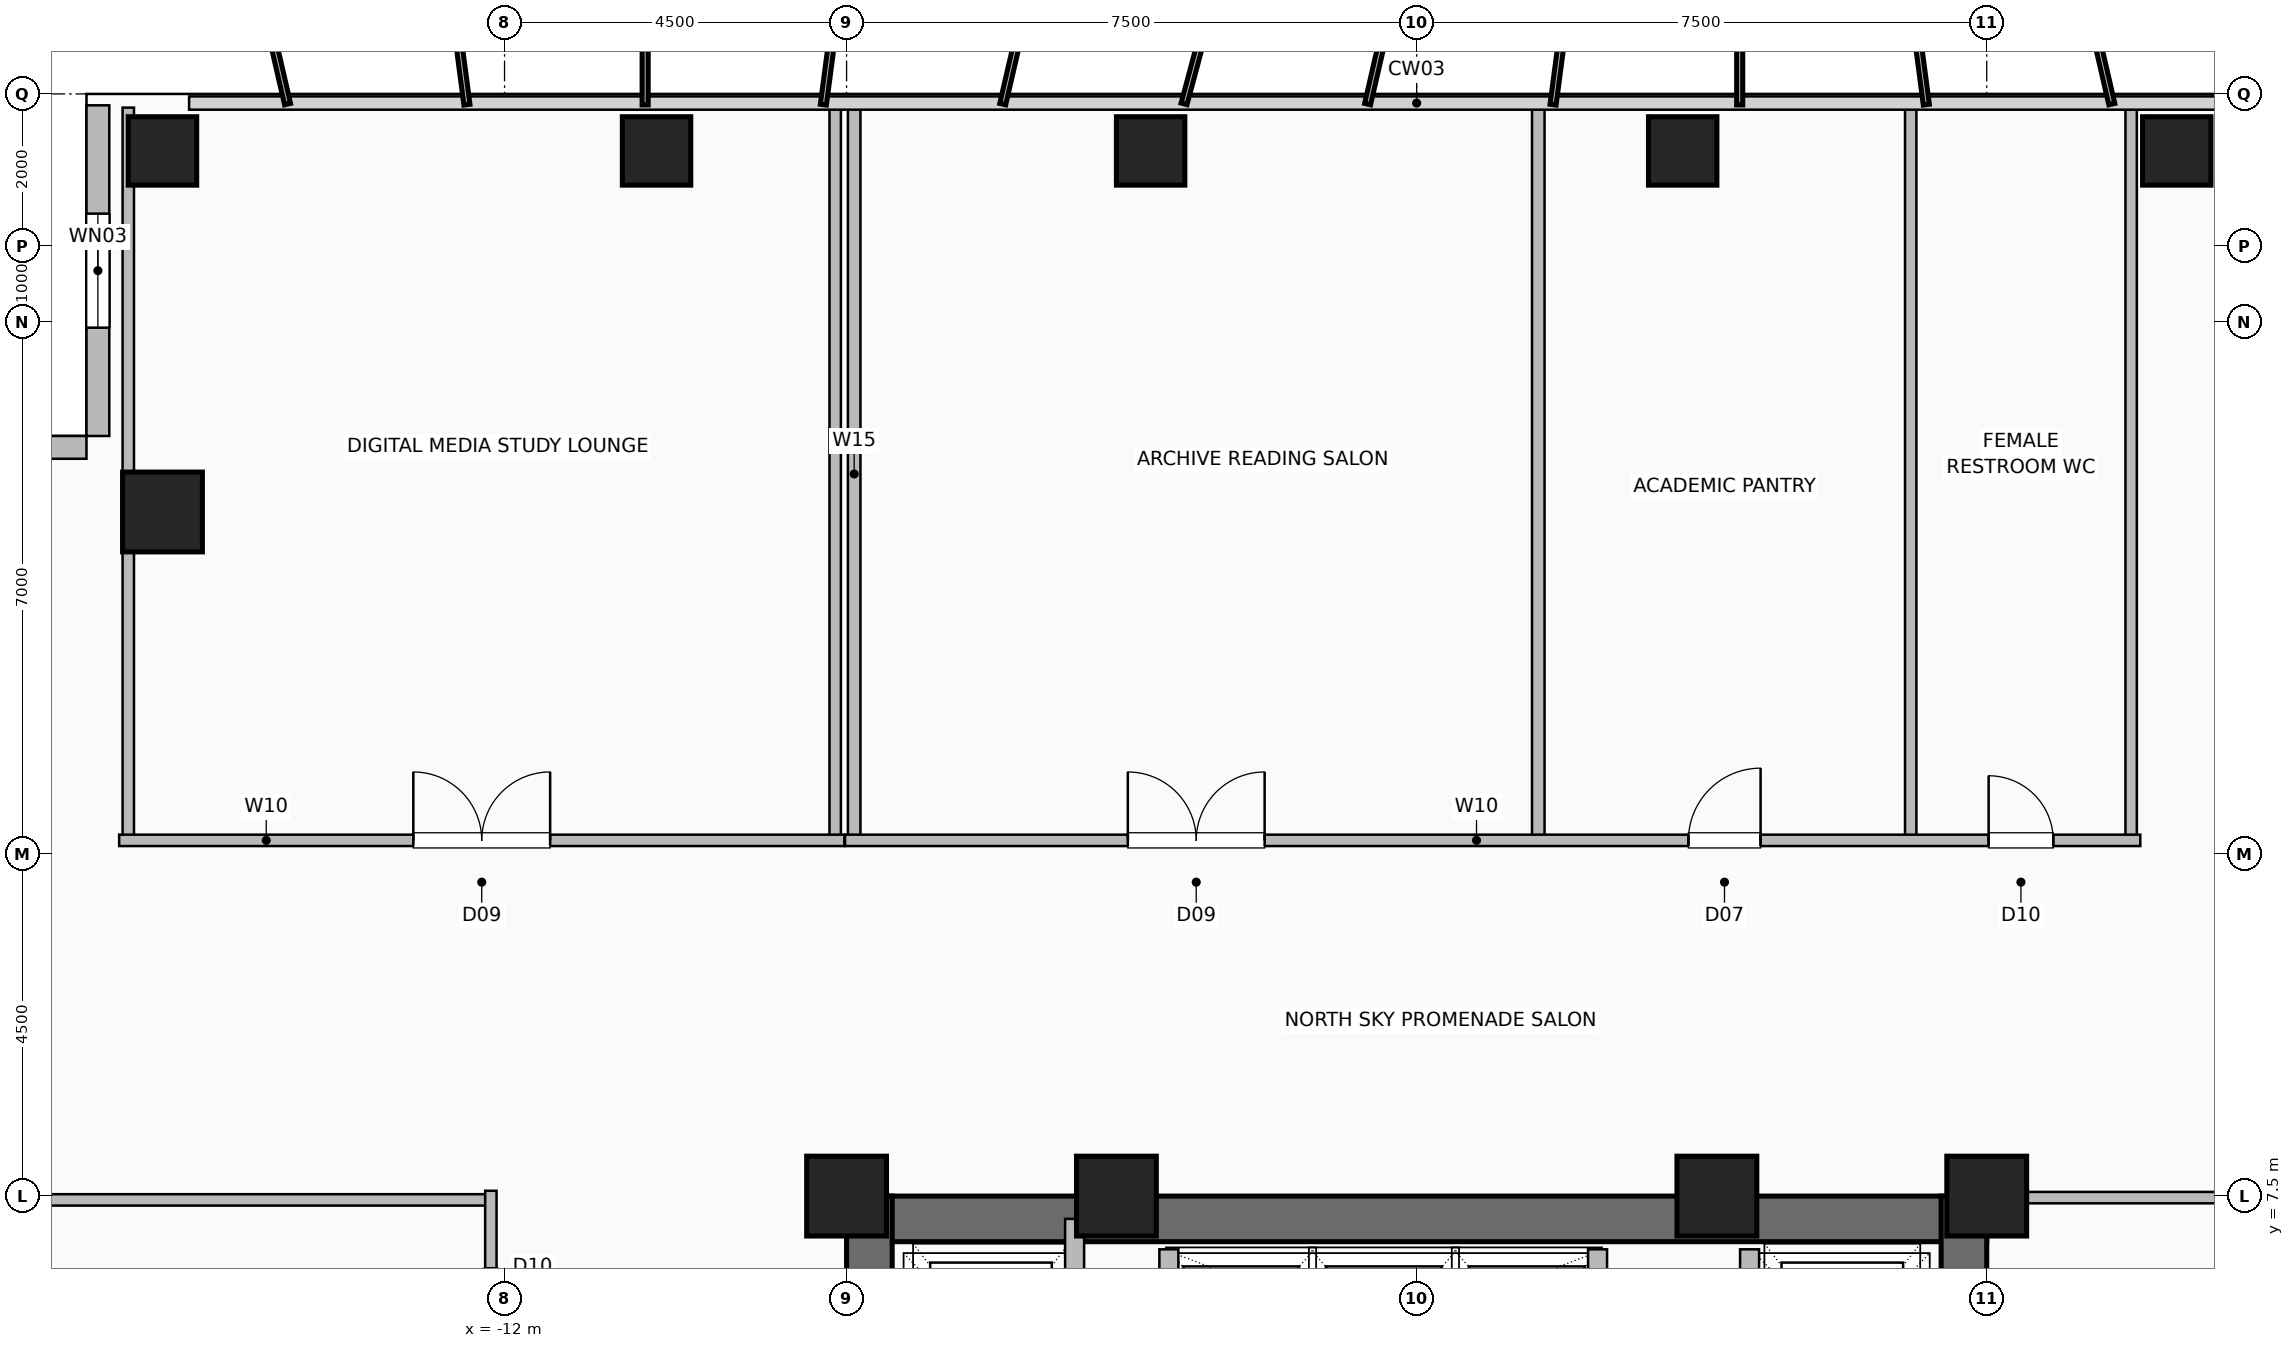
"""IFC4 building model, lengths in metres.
Left out: names, types, materials, properties, quantities, classifications, styles, units other than length and angle.
Written with IfcOpenShell. Run it as: python <this file> out.ifc"""

import sys

from ifc_helpers import new_model, si_unit, direction, frame, frame_2d, origin, origin_2d, place, context, subcontext, project, spatial, rectangle, hollow_rectangle, extrude, element, fill, save


model = new_model("IFC4")
c1 = context("Model", 3, precision=1e-05, world=origin(), true_north=direction((0.0, 1.0)))
c2 = subcontext(c1, "Body", "Model", "MODEL_VIEW")
j1 = project(units=[si_unit("LENGTHUNIT", "METRE"), si_unit("PLANEANGLEUNIT", "RADIAN")], contexts=[c1])
p1 = place(None, origin())
s1 = spatial("IfcSite", under=j1, at=p1, CompositionType="ELEMENT")
p2 = place(p1, origin())
s2 = spatial("IfcBuilding", under=s1, at=p2, CompositionType="ELEMENT")
p3 = place(p2, frame((0.0, 0.0, 137.2)))
s3 = spatial("IfcBuildingStorey", under=s2, at=p3, CompositionType="ELEMENT", Elevation=137.2)
for number, where, z_axis, x_axis in (
    (1, (7.5, 7.5, 0.0), (0.0, 0.0, 1.0), (1.0, 0.0, 0.0)),
    (2, (3.95, 7.5, 0.0), (0.0, 0.0, 1.0), (1.0, 0.0, 0.0)),
    (3, (-3.95, 7.5, 0.0), (0.0, 0.0, 1.0), (1.0, 0.0, 0.0)),
    (4, (-7.5, 7.5, 0.0), (0.0, 0.0, 1.0), (1.0, 0.0, 0.0)),
):
    element("IfcColumn", number, at=place(p3, frame(where, z_axis=z_axis, x_axis=x_axis)), inside=s3, PredefinedType="COLUMN", context=c2, shape_type="SweptSolid", body=[
        extrude(hollow_rectangle(XDim=1.05, YDim=1.05, WallThickness=0.05, at=origin_2d()), origin(), (0.0, 0.0, 1.0), 3.6),
    ])
for number, where, z_axis, x_axis in (
    (5, (-16.5, 21.25, 0.0), (0.0, 0.0, 1.0), (1.0, 0.0, 0.0)),
    (6, (-10.0, 21.25, 0.0), (0.0, 0.0, 1.0), (1.0, 0.0, 0.0)),
    (7, (-3.5, 21.25, 0.0), (0.0, 0.0, 1.0), (1.0, 0.0, 0.0)),
    (8, (3.5, 21.25, 0.0), (0.0, 0.0, 1.0), (1.0, 0.0, 0.0)),
    (9, (10.0, 21.25, 0.0), (0.0, 0.0, 1.0), (1.0, 0.0, 0.0)),
):
    element("IfcColumn", number, at=place(p3, frame(where, z_axis=z_axis, x_axis=x_axis)), inside=s3, PredefinedType="COLUMN", context=c2, shape_type="SweptSolid", body=[
        extrude(hollow_rectangle(XDim=0.9, YDim=0.9, WallThickness=0.045, at=origin_2d()), origin(), (0.0, 0.0, 1.0), 3.6),
    ])
p4 = place(p3, frame((-16.5, 16.5, 0.0), z_axis=(0.0, 0.0, 1.0), x_axis=(1.0, 0.0, 0.0)))
e10 = element("IfcColumn", 10, at=p4, inside=s3, PredefinedType="COLUMN", context=c2, shape_type="SweptSolid", body=[
    extrude(hollow_rectangle(XDim=1.05, YDim=1.05, WallThickness=0.05, at=origin_2d()), origin(), (0.0, 0.0, 1.0), 3.6),
])
p5 = place(p3, frame((-17.35, 21.85, 0.0), z_axis=(0.0, 0.0, 1.0), x_axis=(0.0, -1.0, 0.0)))
e11 = element("IfcWall", 11, at=p5, inside=s3, PredefinedType="SOLIDWALL", context=c2, shape_type="SweptSolid", body=[
    extrude(rectangle(XDim=4.35, YDim=0.3, at=frame_2d((2.175, 0.0))), origin(), (0.0, 0.0, 1.0), 3.36),
])
p6 = place(p5, frame((1.425, 0.0, 0.9)))
e12 = element("IfcOpeningElement", 12, at=p6, cuts=e11, PredefinedType="OPENING", context=c2, shape_type="SweptSolid", body=[
    extrude(rectangle(XDim=1.5, YDim=1.8, at=frame_2d((0.75, 0.9))), frame((0.0, 0.16, 0.0), z_axis=(0.0, -1.0, 0.0), x_axis=(1.0, 0.0, 0.0)), (0.0, 0.0, 1.0), 0.32),
])
p7 = place(p3, frame((-21.85, 17.35, 0.0), z_axis=(0.0, 0.0, 1.0), x_axis=(1.0, 0.0, 0.0)))
e13 = element("IfcWall", 13, at=p7, inside=s3, PredefinedType="SOLIDWALL", context=c2, shape_type="SweptSolid", body=[
    extrude(rectangle(XDim=4.35, YDim=0.3, at=frame_2d((2.175, 0.0))), origin(), (0.0, 0.0, 1.0), 3.36),
])
p8 = place(p3, frame((-7.5, 7.2, 0.0), z_axis=(0.0, 0.0, 1.0), x_axis=(1.0, 0.0, 0.0)))
e14 = element("IfcWall", 14, at=p8, inside=s3, PredefinedType="SHEAR", context=c2, shape_type="SweptSolid", body=[
    extrude(rectangle(XDim=15.0, YDim=0.6, at=frame_2d((7.5, 0.0))), origin(), (0.0, 0.0, 1.0), 3.36),
])
p9 = place(p3, frame((-7.2, -7.5, 0.0), z_axis=(0.0, 0.0, 1.0), x_axis=(0.0, 1.0, 0.0)))
e15 = element("IfcWall", 15, at=p9, inside=s3, PredefinedType="SHEAR", context=c2, shape_type="SweptSolid", body=[
    extrude(rectangle(XDim=15.0, YDim=0.6, at=frame_2d((7.5, 0.0))), origin(), (0.0, 0.0, 1.0), 3.36),
])
p10 = place(p9, frame((9.5, 0.0, 0.0)))
e16 = element("IfcOpeningElement", 16, at=p10, cuts=e15, PredefinedType="OPENING", context=c2, shape_type="SweptSolid", body=[
    extrude(rectangle(XDim=1.0, YDim=2.08, at=frame_2d((0.5, 1.04))), frame((0.0, 0.31, 0.0), z_axis=(0.0, -1.0, 0.0), x_axis=(1.0, 0.0, 0.0)), (0.0, 0.0, 1.0), 0.62),
])
p11 = place(p3, frame((7.2, -7.5, 0.0), z_axis=(0.0, 0.0, 1.0), x_axis=(0.0, 1.0, 0.0)))
e17 = element("IfcWall", 17, at=p11, inside=s3, PredefinedType="SHEAR", context=c2, shape_type="SweptSolid", body=[
    extrude(rectangle(XDim=15.0, YDim=0.6, at=frame_2d((7.5, 0.0))), origin(), (0.0, 0.0, 1.0), 3.36),
])
for number, where, z_axis, x_axis in (
    (18, (-3.26, 4.58, 0.0), (0.0, 0.0, 1.0), (0.0, 1.0, 0.0)),
    (19, (2.38, 4.58, 0.0), (0.0, 0.0, 1.0), (0.0, 1.0, 0.0)),
):
    element("IfcWall", number, at=place(p3, frame(where, z_axis=z_axis, x_axis=x_axis)), inside=s3, PredefinedType="SHEAR", context=c2, shape_type="SweptSolid", body=[
        extrude(rectangle(XDim=2.22, YDim=0.25, at=frame_2d((1.11, 0.0))), origin(), (0.0, 0.0, 1.0), 3.36),
    ])
p12 = place(p3, frame((-4.5, 4.35, 0.0), z_axis=(0.0, 0.0, 1.0), x_axis=(0.0, 1.0, 0.0)))
e20 = element("IfcWall", 20, at=p12, inside=s3, PredefinedType="SHEAR", context=c2, shape_type="SweptSolid", body=[
    extrude(rectangle(XDim=2.85, YDim=0.25, at=frame_2d((1.425, 0.0))), origin(), (0.0, 0.0, 1.0), 3.36),
])
p13 = place(p3, frame((4.38, 4.3, 0.0), z_axis=(0.0, 0.0, 1.0), x_axis=(0.0, 1.0, 0.0)))
e21 = element("IfcWall", 21, at=p13, inside=s3, PredefinedType="SHEAR", context=c2, shape_type="SweptSolid", body=[
    extrude(rectangle(XDim=2.5, YDim=0.25, at=frame_2d((1.25, 0.0))), origin(), (0.0, 0.0, 1.0), 3.36),
])
p14 = place(p13, frame((0.8, 0.0, 0.0)))
e22 = element("IfcOpeningElement", 22, at=p14, cuts=e21, PredefinedType="OPENING", context=c2, shape_type="SweptSolid", body=[
    extrude(rectangle(XDim=1.2, YDim=2.2, at=frame_2d((0.6, 1.1))), frame((0.0, 0.135, 0.0), z_axis=(0.0, -1.0, 0.0), x_axis=(1.0, 0.0, 0.0)), (0.0, 0.0, 1.0), 0.27),
])
p15 = place(p3, frame((-21.82, 7.45, 0.0), z_axis=(0.0, 0.0, 1.0), x_axis=(1.0, 0.0, 0.0)))
e23 = element("IfcWall", 23, at=p15, inside=s3, PredefinedType="PARTITIONING", context=c2, shape_type="SweptSolid", body=[
    extrude(rectangle(XDim=9.64, YDim=0.15, at=frame_2d((4.82, 0.0))), origin(), (0.0, 0.0, 1.0), 3.36),
])
p16 = place(p3, frame((-12.18, -7.57, 0.0), z_axis=(0.0, 0.0, 1.0), x_axis=(0.0, 1.0, 0.0)))
e24 = element("IfcWall", 24, at=p16, inside=s3, PredefinedType="PARTITIONING", context=c2, shape_type="SweptSolid", body=[
    extrude(rectangle(XDim=15.14, YDim=0.15, at=frame_2d((7.57, 0.0))), origin(), (0.0, 0.0, 1.0), 3.36),
])
p17 = place(p16, frame((2.27, 0.0, 0.0)))
e25 = element("IfcOpeningElement", 25, at=p17, cuts=e24, PredefinedType="OPENING", context=c2, shape_type="SweptSolid", body=[
    extrude(rectangle(XDim=0.95, YDim=2.06, at=frame_2d((0.475, 1.03))), frame((0.0, 0.085, 0.0), z_axis=(0.0, -1.0, 0.0), x_axis=(1.0, 0.0, 0.0)), (0.0, 0.0, 1.0), 0.17),
])
p18 = place(p16, frame((8.395, 0.0, 0.0)))
e26 = element("IfcOpeningElement", 26, at=p18, cuts=e24, PredefinedType="OPENING", context=c2, shape_type="SweptSolid", body=[
    extrude(rectangle(XDim=0.95, YDim=2.06, at=frame_2d((0.475, 1.03))), frame((0.0, 0.085, 0.0), z_axis=(0.0, -1.0, 0.0), x_axis=(1.0, 0.0, 0.0)), (0.0, 0.0, 1.0), 0.17),
])
p19 = place(p16, frame((13.27, 0.0, 0.0)))
e27 = element("IfcOpeningElement", 27, at=p19, cuts=e24, PredefinedType="OPENING", context=c2, shape_type="SweptSolid", body=[
    extrude(rectangle(XDim=0.85, YDim=2.05, at=frame_2d((0.425, 1.025))), frame((0.0, 0.085, 0.0), z_axis=(0.0, -1.0, 0.0), x_axis=(1.0, 0.0, 0.0)), (0.0, 0.0, 1.0), 0.17),
])
for number, where, z_axis, x_axis in (
    (28, (-16.95, 12.18, 0.0), (0.0, 0.0, 1.0), (0.0, 1.0, 0.0)),
    (29, (-7.65, 12.18, 0.0), (0.0, 0.0, 1.0), (0.0, 1.0, 0.0)),
):
    element("IfcWall", number, at=place(p3, frame(where, z_axis=z_axis, x_axis=x_axis)), inside=s3, PredefinedType="PARTITIONING", context=c2, shape_type="SweptSolid", body=[
        extrude(rectangle(XDim=9.64, YDim=0.15, at=frame_2d((4.82, 0.0))), origin(), (0.0, 0.0, 1.0), 3.36),
    ])
p20 = place(p3, frame((-17.07, 12.18, 0.0), z_axis=(0.0, 0.0, 1.0), x_axis=(1.0, 0.0, 0.0)))
e30 = element("IfcWall", 30, at=p20, inside=s3, PredefinedType="PARTITIONING", context=c2, shape_type="SweptSolid", body=[
    extrude(rectangle(XDim=9.54, YDim=0.15, at=frame_2d((4.77, 0.0))), origin(), (0.0, 0.0, 1.0), 3.36),
])
p21 = place(p20, frame((3.87, 0.0, 0.0)))
e31 = element("IfcOpeningElement", 31, at=p21, cuts=e30, PredefinedType="OPENING", context=c2, shape_type="SweptSolid", body=[
    extrude(rectangle(XDim=1.8, YDim=2.08, at=frame_2d((0.9, 1.04))), frame((0.0, 0.085, 0.0), z_axis=(0.0, -1.0, 0.0), x_axis=(1.0, 0.0, 0.0)), (0.0, 0.0, 1.0), 0.17),
])
for number, where, z_axis, x_axis in (
    (32, (-7.4, 12.18, 0.0), (0.0, 0.0, 1.0), (0.0, 1.0, 0.0)),
    (33, (1.6, 12.18, 0.0), (0.0, 0.0, 1.0), (0.0, 1.0, 0.0)),
):
    element("IfcWall", number, at=place(p3, frame(where, z_axis=z_axis, x_axis=x_axis)), inside=s3, PredefinedType="PLUMBINGWALL", context=c2, shape_type="SweptSolid", body=[
        extrude(rectangle(XDim=9.64, YDim=0.165, at=frame_2d((4.82, 0.0))), origin(), (0.0, 0.0, 1.0), 3.36),
    ])
for number, where, z_axis, x_axis in (
    (34, (6.5, 12.18, 0.0), (0.0, 0.0, 1.0), (0.0, 1.0, 0.0)),
    (35, (9.4, 12.18, 0.0), (0.0, 0.0, 1.0), (0.0, 1.0, 0.0)),
):
    element("IfcWall", number, at=place(p3, frame(where, z_axis=z_axis, x_axis=x_axis)), inside=s3, PredefinedType="PARTITIONING", context=c2, shape_type="SweptSolid", body=[
        extrude(rectangle(XDim=9.64, YDim=0.15, at=frame_2d((4.82, 0.0))), origin(), (0.0, 0.0, 1.0), 3.36),
    ])
p22 = place(p3, frame((-7.52, 12.18, 0.0), z_axis=(0.0, 0.0, 1.0), x_axis=(1.0, 0.0, 0.0)))
e36 = element("IfcWall", 36, at=p22, inside=s3, PredefinedType="PARTITIONING", context=c2, shape_type="SweptSolid", body=[
    extrude(rectangle(XDim=17.04, YDim=0.15, at=frame_2d((8.52, 0.0))), origin(), (0.0, 0.0, 1.0), 3.36),
])
p23 = place(p22, frame((3.72, 0.0, 0.0)))
e37 = element("IfcOpeningElement", 37, at=p23, cuts=e36, PredefinedType="OPENING", context=c2, shape_type="SweptSolid", body=[
    extrude(rectangle(XDim=1.8, YDim=2.08, at=frame_2d((0.9, 1.04))), frame((0.0, 0.085, 0.0), z_axis=(0.0, -1.0, 0.0), x_axis=(1.0, 0.0, 0.0)), (0.0, 0.0, 1.0), 0.17),
])
p24 = place(p22, frame((11.095, 0.0, 0.0)))
e38 = element("IfcOpeningElement", 38, at=p24, cuts=e36, PredefinedType="OPENING", context=c2, shape_type="SweptSolid", body=[
    extrude(rectangle(XDim=0.95, YDim=2.06, at=frame_2d((0.475, 1.03))), frame((0.0, 0.085, 0.0), z_axis=(0.0, -1.0, 0.0), x_axis=(1.0, 0.0, 0.0)), (0.0, 0.0, 1.0), 0.17),
])
p25 = place(p22, frame((15.045, 0.0, 0.0)))
e39 = element("IfcOpeningElement", 39, at=p25, cuts=e36, PredefinedType="OPENING", context=c2, shape_type="SweptSolid", body=[
    extrude(rectangle(XDim=0.85, YDim=2.05, at=frame_2d((0.425, 1.025))), frame((0.0, 0.085, 0.0), z_axis=(0.0, -1.0, 0.0), x_axis=(1.0, 0.0, 0.0)), (0.0, 0.0, 1.0), 0.17),
])
p26 = place(p3, frame((7.6, 7.48, 0.0), z_axis=(0.0, 0.0, 1.0), x_axis=(1.0, 0.0, 0.0)))
e40 = element("IfcWall", 40, at=p26, inside=s3, PredefinedType="PARTITIONING", context=c2, shape_type="SweptSolid", body=[
    extrude(rectangle(XDim=14.22, YDim=0.15, at=frame_2d((7.11, 0.0))), origin(), (0.0, 0.0, 1.0), 3.36),
])
p27 = place(p6, origin())
e41 = element("IfcWindow", 41, at=p27, inside=s3, PartitioningType="SINGLE_PANEL", PredefinedType="WINDOW", context=c2, shape_type="SweptSolid", body=[
    extrude(rectangle(XDim=1.5, YDim=1.8, at=frame_2d((0.75, 0.9))), frame((0.0, 0.03, 0.0), z_axis=(0.0, -1.0, 0.0), x_axis=(1.0, 0.0, 0.0)), (0.0, 0.0, 1.0), 0.06),
])
fill(e12, e41)
p28 = place(p21, origin())
e42 = element("IfcDoor", 42, at=p28, inside=s3, OperationType="DOUBLE_DOOR_SINGLE_SWING", PredefinedType="DOOR", context=c2, shape_type="SweptSolid", body=[
    extrude(rectangle(XDim=1.8, YDim=2.08, at=frame_2d((0.9, 1.04))), frame((0.0, 0.025, 0.0), z_axis=(0.0, -1.0, 0.0), x_axis=(1.0, 0.0, 0.0)), (0.0, 0.0, 1.0), 0.05),
])
fill(e31, e42)
p29 = place(p23, origin())
e43 = element("IfcDoor", 43, at=p29, inside=s3, OperationType="DOUBLE_DOOR_SINGLE_SWING", PredefinedType="DOOR", context=c2, shape_type="SweptSolid", body=[
    extrude(rectangle(XDim=1.8, YDim=2.08, at=frame_2d((0.9, 1.04))), frame((0.0, 0.025, 0.0), z_axis=(0.0, -1.0, 0.0), x_axis=(1.0, 0.0, 0.0)), (0.0, 0.0, 1.0), 0.05),
])
fill(e37, e43)
p30 = place(p24, origin())
e44 = element("IfcDoor", 44, at=p30, inside=s3, OperationType="SINGLE_SWING_RIGHT", PredefinedType="DOOR", context=c2, shape_type="SweptSolid", body=[
    extrude(rectangle(XDim=0.95, YDim=2.06, at=frame_2d((0.475, 1.03))), frame((0.0, 0.025, 0.0), z_axis=(0.0, -1.0, 0.0), x_axis=(1.0, 0.0, 0.0)), (0.0, 0.0, 1.0), 0.05),
])
fill(e38, e44)
p31 = place(p25, origin())
e45 = element("IfcDoor", 45, at=p31, inside=s3, OperationType="SINGLE_SWING_LEFT", PredefinedType="DOOR", context=c2, shape_type="SweptSolid", body=[
    extrude(rectangle(XDim=0.85, YDim=2.05, at=frame_2d((0.425, 1.025))), frame((0.0, 0.025, 0.0), z_axis=(0.0, -1.0, 0.0), x_axis=(1.0, 0.0, 0.0)), (0.0, 0.0, 1.0), 0.05),
])
fill(e39, e45)
save(model, sys.argv[1])
